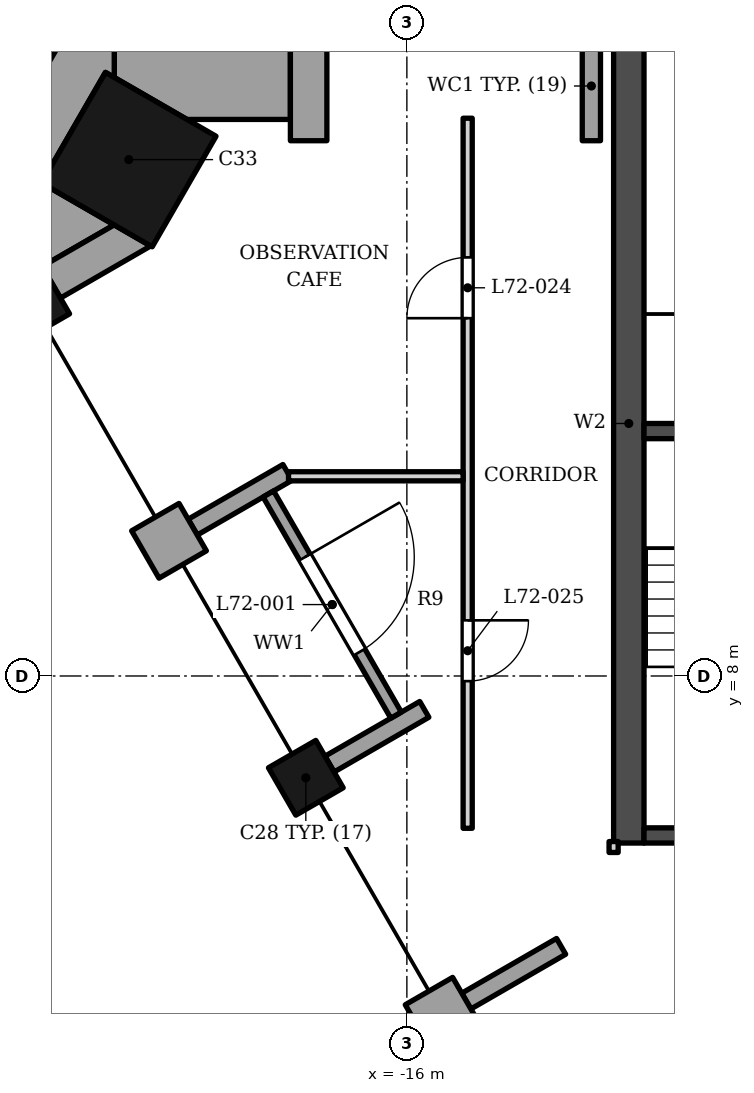
"""IFC4 building model, lengths in metres.
Left out: names, types, materials, properties, quantities, classifications, styles, units other than length and angle.
Written with IfcOpenShell. Run it as: python <this file> out.ifc"""

import sys

from ifc_helpers import new_model, si_unit, direction, frame, frame_2d, origin, origin_2d, place, context, subcontext, project, spatial, polyline, rectangle, outline, extrude, element, fill, save


model = new_model("IFC4")
c1 = context("Model", 3, precision=1e-05, world=origin(), true_north=direction((0.0, 1.0)))
c2 = subcontext(c1, "Body", "Model", "MODEL_VIEW")
j1 = project(units=[si_unit("LENGTHUNIT", "METRE"), si_unit("PLANEANGLEUNIT", "RADIAN")], contexts=[c1])
p1 = place(None, origin())
s1 = spatial("IfcSite", under=j1, at=p1, CompositionType="ELEMENT")
p2 = place(p1, origin())
s2 = spatial("IfcBuilding", under=s1, at=p2, CompositionType="ELEMENT")
p3 = place(p2, frame((0.0, 0.0, 302.5)))
s3 = spatial("IfcBuildingStorey", under=s2, at=p3, CompositionType="ELEMENT", Elevation=302.5)
p4 = place(p3, frame((-12.35, 5.253, 0.0), z_axis=(0.0, 0.0, 1.0), x_axis=(0.0, 1.0, 0.0)))
e1 = element("IfcWall", 1, at=p4, inside=s3, PredefinedType="SHEAR", context=c2, shape_type="SweptSolid", body=[
    extrude(rectangle(XDim=13.8, YDim=0.5, at=frame_2d((6.9, 0.0))), origin(), (0.0, 0.0, 1.0), 8.0),
])
for number, where, z_axis, x_axis in (
    (2, (-12.1, 12.028, 0.0), (0.0, 0.0, 1.0), (1.0, 0.0, 0.0)),
    (3, (-12.1, 5.378, 0.0), (0.0, 0.0, 1.0), (1.0, 0.0, 0.0)),
):
    element("IfcWall", number, at=place(p3, frame(where, z_axis=z_axis, x_axis=x_axis)), inside=s3, PredefinedType="SHEAR", context=c2, shape_type="SweptSolid", body=[
        extrude(rectangle(XDim=3.75, YDim=0.25, at=frame_2d((1.875, 0.0))), origin(), (0.0, 0.0, 1.0), 8.0),
    ])
p5 = place(p3, frame((-20.573, 16.492, 0.0), z_axis=(0.0, 0.0, 1.0), x_axis=(0.866025395058, -0.500000015115, 0.0)))
e4 = element("IfcColumn", 4, at=p5, inside=s3, PredefinedType="COLUMN", context=c2, shape_type="SweptSolid", body=[
    extrude(rectangle(XDim=2.1, YDim=2.1, at=origin_2d()), origin(), (0.0, 0.0, 1.0), 8.0),
])
for number, where, z_axis, x_axis in (
    (5, (-22.162, 14.12, 0.0), (0.0, 0.0, 1.0), (0.5, -0.866, 0.0)),
    (6, (-17.662, 6.326, 0.0), (0.0, 0.0, 1.0), (0.5, -0.866, 0.0)),
):
    element("IfcColumn", number, at=place(p3, frame(where, z_axis=z_axis, x_axis=x_axis)), inside=s3, PredefinedType="COLUMN", context=c2, shape_type="SweptSolid", body=[
        extrude(rectangle(XDim=0.9, YDim=0.9, at=origin_2d()), origin(), (0.0, 0.0, 1.0), 8.0),
    ])
p6 = place(p3, origin())
e7 = element("IfcWall", 7, at=p6, inside=s3, PredefinedType="SOLIDWALL", context=c2, shape_type="SweptSolid", body=[
    extrude(outline(polyline([(-21.997, 14.735), (-21.697, 14.215), (-20.213, 15.072), (-20.813, 15.418), (-21.997, 14.735)])), origin(), (0.0, 0.0, 1.0), 7.0),
])
p7 = place(p3, frame((-20.302, 9.998, 0.0), z_axis=(0.0, 0.0, 1.0), x_axis=(0.866013897511, 0.50001992892, 0.0)))
e8 = element("IfcWall", 8, at=p7, inside=s3, PredefinedType="SOLIDWALL", context=c2, shape_type="SweptSolid", body=[
    extrude(rectangle(XDim=0.9, YDim=0.9, at=frame_2d((0.45, 0.0))), origin(), (0.0, 0.0, 1.0), 7.0),
])
for number, where, z_axis, x_axis in (
    (9, (-17.963, 11.348, 0.0), (0.0, 0.0, 1.0), (-0.866, -0.5, 0.0)),
    (10, (-17.272, 6.551, 0.0), (0.0, 0.0, 1.0), (0.866, 0.5, 0.0)),
):
    element("IfcWall", number, at=place(p3, frame(where, z_axis=z_axis, x_axis=x_axis)), inside=s3, PredefinedType="SOLIDWALL", context=c2, shape_type="SweptSolid", body=[
        extrude(rectangle(XDim=1.8, YDim=0.3, at=frame_2d((0.9, 0.0))), origin(), (0.0, 0.0, 1.0), 7.0),
    ])
p8 = place(p3, frame((-15.022, 2.654, 0.0), z_axis=(0.0, 0.0, 1.0), x_axis=(-0.865896406789, -0.500223362819, 0.0)))
e11 = element("IfcWall", 11, at=p8, inside=s3, PredefinedType="SOLIDWALL", context=c2, shape_type="SweptSolid", body=[
    extrude(rectangle(XDim=0.9, YDim=0.9, at=frame_2d((0.45, 0.0))), origin(), (0.0, 0.0, 1.0), 7.0),
])
p9 = place(p3, frame((-13.463, 3.554, 0.0), z_axis=(0.0, 0.0, 1.0), x_axis=(-0.866047807691, -0.499961193289, 0.0)))
e12 = element("IfcWall", 12, at=p9, inside=s3, PredefinedType="SOLIDWALL", context=c2, shape_type="SweptSolid", body=[
    extrude(rectangle(XDim=1.8, YDim=0.3, at=frame_2d((0.9, 0.0))), origin(), (0.0, 0.0, 1.0), 7.0),
])
p10 = place(p3, frame((-21.937, 13.73, 0.0), z_axis=(0.0, 0.0, 1.0), x_axis=(0.499931829785, -0.866064758299, 0.0)))
e13 = element("IfcWall", 13, at=p10, inside=s3, PredefinedType="PARAPET", context=c2, shape_type="SweptSolid", body=[
    extrude(rectangle(XDim=3.6, YDim=0.2, at=frame_2d((1.8, 0.0))), origin(), (0.0, 0.0, 1.0), 1.1),
])
p11 = place(p3, frame((-19.687, 9.833, 0.0), z_axis=(0.0, 0.0, 1.0), x_axis=(0.499961193289, -0.866047807691, 0.0)))
e14 = element("IfcWall", 14, at=p11, inside=s3, PredefinedType="PARAPET", context=c2, shape_type="SweptSolid", body=[
    extrude(rectangle(XDim=3.6, YDim=0.2, at=frame_2d((1.8, 0.0))), origin(), (0.0, 0.0, 1.0), 1.1),
])
p12 = place(p3, frame((-18.278, 10.993, 0.0), z_axis=(0.0, 0.0, 1.0), x_axis=(0.500002543286, -0.866023935413, 0.0)))
e15 = element("IfcWall", 15, at=p12, inside=s3, PredefinedType="ELEMENTEDWALL", context=c2, shape_type="SweptSolid", body=[
    extrude(rectangle(XDim=4.2, YDim=0.2, at=frame_2d((2.1, 0.0))), origin(), (0.0, 0.0, 1.0), 7.0),
])
p13 = place(p12, frame((1.2, 0.0, 0.0)))
e16 = element("IfcOpeningElement", 16, at=p13, cuts=e15, PredefinedType="OPENING", context=c2, shape_type="SweptSolid", body=[
    extrude(rectangle(XDim=1.8, YDim=2.7, at=frame_2d((0.9, 1.35))), frame((0.0, 0.11, 0.0), z_axis=(0.0, -1.0, 0.0), x_axis=(1.0, 0.0, 0.0)), (0.0, 0.0, 1.0), 0.22),
])
p14 = place(p3, frame((-17.437, 5.936, 0.0), z_axis=(0.0, 0.0, 1.0), x_axis=(0.499961193289, -0.866047807691, 0.0)))
e17 = element("IfcWall", 17, at=p14, inside=s3, PredefinedType="PARAPET", context=c2, shape_type="SweptSolid", body=[
    extrude(rectangle(XDim=3.6, YDim=0.2, at=frame_2d((1.8, 0.0))), origin(), (0.0, 0.0, 1.0), 1.1),
])
p15 = place(p3, origin())
e18 = element("IfcWall", 18, at=p15, inside=s3, PredefinedType="SOLIDWALL", context=c2, shape_type="SweptSolid", body=[
    extrude(outline(polyline([(-12.816, 16.802), (-12.816, 18.603), (-13.116, 18.603), (-13.116, 16.802), (-12.816, 16.802)])), origin(), (0.0, 0.0, 1.0), 7.0),
])
p16 = place(p3, origin())
e19 = element("IfcWall", 19, at=p16, inside=s3, PredefinedType="SOLIDWALL", context=c2, shape_type="SweptSolid", body=[
    extrude(outline(polyline([(-17.916, 18.603), (-17.916, 16.802), (-17.316, 16.802), (-17.316, 18.603), (-17.916, 18.603)])), origin(), (0.0, 0.0, 1.0), 7.0),
])
p17 = place(p3, origin())
e20 = element("IfcWall", 20, at=p17, inside=s3, PredefinedType="SOLIDWALL", context=c2, shape_type="SweptSolid", body=[
    extrude(outline(polyline([(-19.617, 17.153), (-17.916, 17.153), (-17.916, 18.603), (-17.916, 18.603), (-17.916, 19.502), (-20.813, 19.502), (-20.813, 17.843), (-19.617, 17.153)])), origin(), (0.0, 0.0, 1.0), 7.0),
])
p18 = place(p3, origin())
e21 = element("IfcWall", 21, at=p18, inside=s3, PredefinedType="SOLIDWALL", context=c2, shape_type="SweptSolid", body=[
    extrude(outline(polyline([(-20.957, 17.926), (-20.813, 17.843), (-20.813, 19.052), (-21.202, 19.278), (-23.301, 15.643), (-21.863, 14.812), (-20.813, 15.418), (-22.007, 16.108), (-20.957, 17.926)])), origin(), (0.0, 0.0, 1.0), 7.0),
])
p19 = place(p3, frame((-12.6, 5.098, 0.0), z_axis=(0.0, 0.0, 1.0), x_axis=(0.0, 1.0, 0.0)))
e22 = element("IfcWall", 22, at=p19, inside=s3, PredefinedType="PARTITIONING", context=c2, shape_type="SweptSolid", body=[
    extrude(rectangle(XDim=0.18, YDim=0.15, at=frame_2d((0.09, 0.0))), origin(), (0.0, 0.0, 1.0), 7.8),
])
p20 = place(p3, frame((-15.0, 5.495, 0.0), z_axis=(0.0, 0.0, 1.0), x_axis=(0.0, 1.0, 0.0)))
e23 = element("IfcWall", 23, at=p20, inside=s3, PredefinedType="PARTITIONING", context=c2, shape_type="SweptSolid", body=[
    extrude(rectangle(XDim=11.677, YDim=0.15, at=frame_2d((5.839, 0.0))), origin(), (0.0, 0.0, 1.0), 7.02),
])
p21 = place(p20, frame((8.389, 0.0, 0.0)))
e24 = element("IfcOpeningElement", 24, at=p21, cuts=e23, PredefinedType="OPENING", context=c2, shape_type="SweptSolid", body=[
    extrude(rectangle(XDim=1.0, YDim=2.1, at=frame_2d((0.5, 1.05))), frame((0.0, 0.085, 0.0), z_axis=(0.0, -1.0, 0.0), x_axis=(1.0, 0.0, 0.0)), (0.0, 0.0, 1.0), 0.17),
])
p22 = place(p20, frame((2.42, 0.0, 0.0)))
e25 = element("IfcOpeningElement", 25, at=p22, cuts=e23, PredefinedType="OPENING", context=c2, shape_type="SweptSolid", body=[
    extrude(rectangle(XDim=1.0, YDim=2.1, at=frame_2d((0.5, 1.05))), frame((0.0, 0.085, 0.0), z_axis=(0.0, -1.0, 0.0), x_axis=(1.0, 0.0, 0.0)), (0.0, 0.0, 1.0), 0.17),
])
p23 = place(p3, frame((-17.946, 11.284, 0.0), z_axis=(0.0, 0.0, 1.0), x_axis=(1.0, 0.0, 0.0)))
e26 = element("IfcWall", 26, at=p23, inside=s3, PredefinedType="PARTITIONING", context=c2, shape_type="SweptSolid", body=[
    extrude(rectangle(XDim=2.871, YDim=0.15, at=frame_2d((1.436, 0.0))), origin(), (0.0, 0.0, 1.0), 7.272),
])
p24 = place(p13, origin())
e27 = element("IfcDoor", 27, at=p24, inside=s3, OperationType="SINGLE_SWING_LEFT", PredefinedType="DOOR", context=c2, shape_type="SweptSolid", body=[
    extrude(rectangle(XDim=1.8, YDim=2.7, at=frame_2d((0.9, 1.35))), frame((0.0, 0.025, 0.0), z_axis=(0.0, -1.0, 0.0), x_axis=(1.0, 0.0, 0.0)), (0.0, 0.0, 1.0), 0.05),
])
fill(e16, e27)
p25 = place(p21, origin())
e28 = element("IfcDoor", 28, at=p25, inside=s3, OperationType="SINGLE_SWING_LEFT", PredefinedType="DOOR", context=c2, shape_type="SweptSolid", body=[
    extrude(rectangle(XDim=1.0, YDim=2.1, at=frame_2d((0.5, 1.05))), frame((0.0, 0.025, 0.0), z_axis=(0.0, -1.0, 0.0), x_axis=(1.0, 0.0, 0.0)), (0.0, 0.0, 1.0), 0.05),
])
fill(e24, e28)
p26 = place(p22, origin())
e29 = element("IfcDoor", 29, at=p26, inside=s3, OperationType="SINGLE_SWING_RIGHT", PredefinedType="DOOR", context=c2, shape_type="SweptSolid", body=[
    extrude(rectangle(XDim=1.0, YDim=2.1, at=frame_2d((0.5, 1.05))), frame((0.0, 0.025, 0.0), z_axis=(0.0, -1.0, 0.0), x_axis=(1.0, 0.0, 0.0)), (0.0, 0.0, 1.0), 0.05),
])
fill(e25, e29)
save(model, sys.argv[1])
